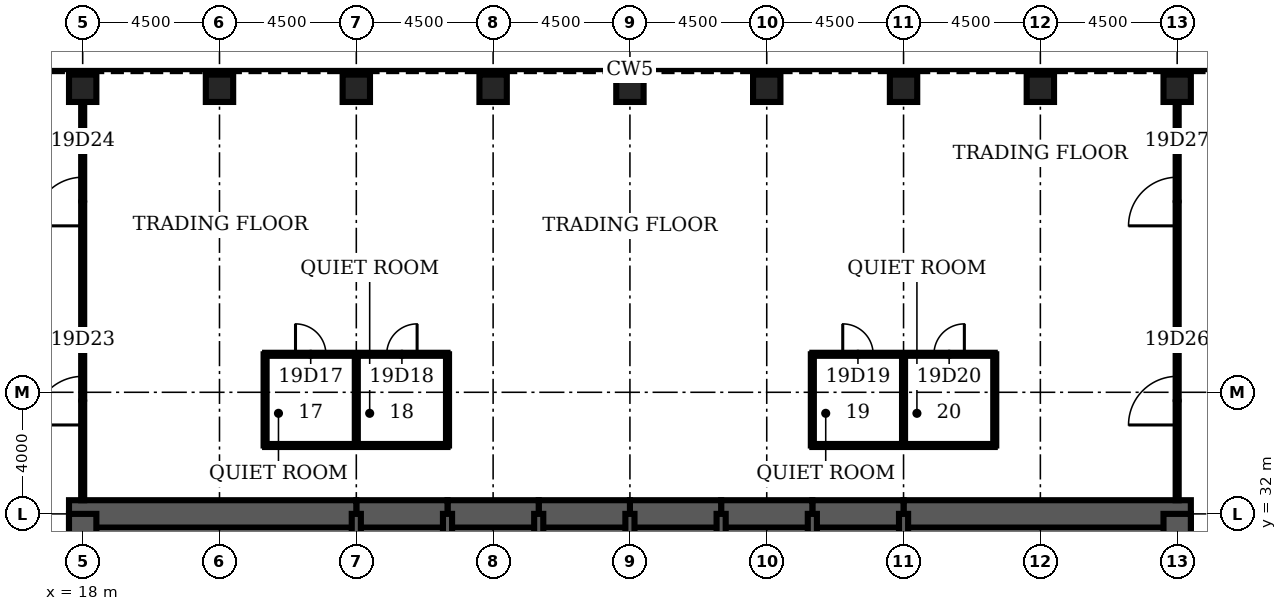
"""IFC4 building model, lengths in metres.
Left out: names, types, materials, properties, quantities, classifications, styles, units other than length and angle.
Written with IfcOpenShell. Run it as: python <this file> out.ifc"""

import sys

from ifc_helpers import new_model, si_unit, direction, frame, frame_2d, origin, origin_2d, place, context, subcontext, project, spatial, rectangle, hollow_rectangle, extrude, element, fill, save


model = new_model("IFC4")
c1 = context("Model", 3, precision=1e-05, world=origin(), true_north=direction((0.0, 1.0)))
c2 = subcontext(c1, "Body", "Model", "MODEL_VIEW")
j1 = project(units=[si_unit("LENGTHUNIT", "METRE"), si_unit("PLANEANGLEUNIT", "RADIAN")], contexts=[c1])
p1 = place(None, origin())
s1 = spatial("IfcSite", under=j1, at=p1, CompositionType="ELEMENT")
p2 = place(p1, origin())
s2 = spatial("IfcBuilding", under=s1, at=p2, CompositionType="ELEMENT")
p3 = place(p2, frame((0.0, 0.0, 90.5)))
s3 = spatial("IfcBuildingStorey", under=s2, at=p3, CompositionType="ELEMENT", Elevation=90.5)
for number, where, z_axis, x_axis in (
    (1, (54.0, 46.0, 0.0), (0.0, 0.0, 1.0), (0.0, 1.0, 0.0)),
    (2, (49.5, 46.0, 0.0), (0.0, 0.0, 1.0), (0.0, 1.0, 0.0)),
    (3, (45.0, 46.0, 0.0), (0.0, 0.0, 1.0), (0.0, 1.0, 0.0)),
    (4, (40.5, 46.0, 0.0), (0.0, 0.0, 1.0), (0.0, 1.0, 0.0)),
    (5, (36.0, 46.0, 0.0), (0.0, 0.0, 1.0), (0.0, 1.0, 0.0)),
    (6, (31.5, 46.0, 0.0), (0.0, 0.0, 1.0), (0.0, 1.0, 0.0)),
    (7, (27.0, 46.0, 0.0), (0.0, 0.0, 1.0), (0.0, 1.0, 0.0)),
    (8, (22.5, 46.0, 0.0), (0.0, 0.0, 1.0), (0.0, 1.0, 0.0)),
    (9, (18.0, 46.0, 0.0), (0.0, 0.0, 1.0), (0.0, 1.0, 0.0)),
):
    element("IfcColumn", number, at=place(p3, frame(where, z_axis=z_axis, x_axis=x_axis)), inside=s3, PredefinedType="COLUMN", context=c2, shape_type="SweptSolid", body=[
        extrude(hollow_rectangle(XDim=0.9, YDim=0.9, WallThickness=0.11, at=origin_2d()), origin(), (0.0, 0.0, 1.0), 4.5),
    ])
p4 = place(p3, frame((54.45, 32.0, 0.0), z_axis=(0.0, 0.0, 1.0), x_axis=(-1.0, 0.0, 0.0)))
e10 = element("IfcWall", 10, at=p4, inside=s3, PredefinedType="SHEAR", context=c2, shape_type="SweptSolid", body=[
    extrude(rectangle(XDim=9.45, YDim=0.9, at=frame_2d((4.725, 0.0))), origin(), (0.0, 0.0, 1.0), 4.5),
])
for number, where, z_axis, x_axis in (
    (11, (45.0, 32.0, 0.0), (0.0, 0.0, 1.0), (-1.0, 0.0, 0.0)),
    (12, (42.0, 32.0, 0.0), (0.0, 0.0, 1.0), (-1.0, 0.0, 0.0)),
    (13, (39.0, 32.0, 0.0), (0.0, 0.0, 1.0), (-1.0, 0.0, 0.0)),
    (14, (36.0, 32.0, 0.0), (0.0, 0.0, 1.0), (-1.0, 0.0, 0.0)),
    (15, (33.0, 32.0, 0.0), (0.0, 0.0, 1.0), (-1.0, 0.0, 0.0)),
    (16, (30.0, 32.0, 0.0), (0.0, 0.0, 1.0), (-1.0, 0.0, 0.0)),
):
    element("IfcWall", number, at=place(p3, frame(where, z_axis=z_axis, x_axis=x_axis)), inside=s3, PredefinedType="SHEAR", context=c2, shape_type="SweptSolid", body=[
        extrude(rectangle(XDim=3.0, YDim=0.9, at=frame_2d((1.5, 0.0))), origin(), (0.0, 0.0, 1.0), 4.5),
    ])
p5 = place(p3, frame((27.0, 32.0, 0.0), z_axis=(0.0, 0.0, 1.0), x_axis=(-1.0, 0.0, 0.0)))
e17 = element("IfcWall", 17, at=p5, inside=s3, PredefinedType="SHEAR", context=c2, shape_type="SweptSolid", body=[
    extrude(rectangle(XDim=9.45, YDim=0.9, at=frame_2d((4.725, 0.0))), origin(), (0.0, 0.0, 1.0), 4.5),
])
for number, where, z_axis, x_axis in (
    (18, (18.0, 32.0, 0.0), (0.0, 0.0, 1.0), (0.0, -1.0, 0.0)),
    (19, (54.0, 28.8, 0.0), (0.0, 0.0, 1.0), (0.0, 1.0, 0.0)),
):
    element("IfcWall", number, at=place(p3, frame(where, z_axis=z_axis, x_axis=x_axis)), inside=s3, PredefinedType="SHEAR", context=c2, shape_type="SweptSolid", body=[
        extrude(rectangle(XDim=3.2, YDim=0.9, at=frame_2d((1.6, 0.0))), origin(), (0.0, 0.0, 1.0), 4.5),
    ])
for number, where, z_axis, x_axis in (
    (20, (27.0, 28.8, 0.0), (0.0, 0.0, 1.0), (0.0, 1.0, 0.0)),
    (21, (30.0, 28.8, 0.0), (0.0, 0.0, 1.0), (0.0, 1.0, 0.0)),
    (22, (33.0, 28.8, 0.0), (0.0, 0.0, 1.0), (0.0, 1.0, 0.0)),
    (23, (36.0, 28.8, 0.0), (0.0, 0.0, 1.0), (0.0, 1.0, 0.0)),
    (24, (39.0, 28.8, 0.0), (0.0, 0.0, 1.0), (0.0, 1.0, 0.0)),
    (25, (42.0, 28.8, 0.0), (0.0, 0.0, 1.0), (0.0, 1.0, 0.0)),
    (26, (45.0, 28.8, 0.0), (0.0, 0.0, 1.0), (0.0, 1.0, 0.0)),
):
    element("IfcWall", number, at=place(p3, frame(where, z_axis=z_axis, x_axis=x_axis)), inside=s3, PredefinedType="SOLIDWALL", context=c2, shape_type="SweptSolid", body=[
        extrude(rectangle(XDim=3.2, YDim=0.3, at=frame_2d((1.6, 0.0))), origin(), (0.0, 0.0, 1.0), 4.5),
    ])
for number, where, z_axis, x_axis in (
    (27, (24.0, 34.25, 0.0), (0.0, 0.0, 1.0), (1.0, 0.0, 0.0)),
    (28, (42.0, 34.25, 0.0), (0.0, 0.0, 1.0), (1.0, 0.0, 0.0)),
):
    element("IfcWall", number, at=place(p3, frame(where, z_axis=z_axis, x_axis=x_axis)), inside=s3, PredefinedType="PARTITIONING", context=c2, shape_type="SweptSolid", body=[
        extrude(rectangle(XDim=6.0, YDim=0.1, at=frame_2d((3.0, 0.0))), origin(), (0.0, 0.0, 1.0), 3.0),
    ])
p6 = place(p3, frame((24.0, 37.25, 0.0), z_axis=(0.0, 0.0, 1.0), x_axis=(1.0, 0.0, 0.0)))
e29 = element("IfcWall", 29, at=p6, inside=s3, PredefinedType="PARTITIONING", context=c2, shape_type="SweptSolid", body=[
    extrude(rectangle(XDim=6.0, YDim=0.1, at=frame_2d((3.0, 0.0))), origin(), (0.0, 0.0, 1.0), 3.0),
])
p7 = place(p6, frame((1.0, 0.0, 0.0)))
e30 = element("IfcOpeningElement", 30, at=p7, cuts=e29, PredefinedType="OPENING", context=c2, shape_type="SweptSolid", body=[
    extrude(rectangle(XDim=1.0, YDim=2.1, at=frame_2d((0.5, 1.05))), frame((0.0, 0.06, 0.0), z_axis=(0.0, -1.0, 0.0), x_axis=(1.0, 0.0, 0.0)), (0.0, 0.0, 1.0), 0.12),
])
p8 = place(p6, frame((4.0, 0.0, 0.0)))
e31 = element("IfcOpeningElement", 31, at=p8, cuts=e29, PredefinedType="OPENING", context=c2, shape_type="SweptSolid", body=[
    extrude(rectangle(XDim=1.0, YDim=2.1, at=frame_2d((0.5, 1.05))), frame((0.0, 0.06, 0.0), z_axis=(0.0, -1.0, 0.0), x_axis=(1.0, 0.0, 0.0)), (0.0, 0.0, 1.0), 0.12),
])
p9 = place(p3, frame((42.0, 37.25, 0.0), z_axis=(0.0, 0.0, 1.0), x_axis=(1.0, 0.0, 0.0)))
e32 = element("IfcWall", 32, at=p9, inside=s3, PredefinedType="PARTITIONING", context=c2, shape_type="SweptSolid", body=[
    extrude(rectangle(XDim=6.0, YDim=0.1, at=frame_2d((3.0, 0.0))), origin(), (0.0, 0.0, 1.0), 3.0),
])
p10 = place(p9, frame((1.0, 0.0, 0.0)))
e33 = element("IfcOpeningElement", 33, at=p10, cuts=e32, PredefinedType="OPENING", context=c2, shape_type="SweptSolid", body=[
    extrude(rectangle(XDim=1.0, YDim=2.1, at=frame_2d((0.5, 1.05))), frame((0.0, 0.06, 0.0), z_axis=(0.0, -1.0, 0.0), x_axis=(1.0, 0.0, 0.0)), (0.0, 0.0, 1.0), 0.12),
])
p11 = place(p9, frame((4.0, 0.0, 0.0)))
e34 = element("IfcOpeningElement", 34, at=p11, cuts=e32, PredefinedType="OPENING", context=c2, shape_type="SweptSolid", body=[
    extrude(rectangle(XDim=1.0, YDim=2.1, at=frame_2d((0.5, 1.05))), frame((0.0, 0.06, 0.0), z_axis=(0.0, -1.0, 0.0), x_axis=(1.0, 0.0, 0.0)), (0.0, 0.0, 1.0), 0.12),
])
p12 = place(p3, frame((18.0, 32.45, 0.0), z_axis=(0.0, 0.0, 1.0), x_axis=(0.0, 1.0, 0.0)))
e35 = element("IfcWall", 35, at=p12, inside=s3, PredefinedType="PARTITIONING", context=c2, shape_type="SweptSolid", body=[
    extrude(rectangle(XDim=13.1, YDim=0.1, at=frame_2d((6.55, 0.0))), origin(), (0.0, 0.0, 1.0), 3.0),
])
p13 = place(p12, frame((2.475, 0.0, 0.0)))
e36 = element("IfcOpeningElement", 36, at=p13, cuts=e35, PredefinedType="OPENING", context=c2, shape_type="SweptSolid", body=[
    extrude(rectangle(XDim=1.6, YDim=2.1, at=frame_2d((0.8, 1.05))), frame((0.0, 0.06, 0.0), z_axis=(0.0, -1.0, 0.0), x_axis=(1.0, 0.0, 0.0)), (0.0, 0.0, 1.0), 0.12),
])
p14 = place(p12, frame((9.025, 0.0, 0.0)))
e37 = element("IfcOpeningElement", 37, at=p14, cuts=e35, PredefinedType="OPENING", context=c2, shape_type="SweptSolid", body=[
    extrude(rectangle(XDim=1.6, YDim=2.1, at=frame_2d((0.8, 1.05))), frame((0.0, 0.06, 0.0), z_axis=(0.0, -1.0, 0.0), x_axis=(1.0, 0.0, 0.0)), (0.0, 0.0, 1.0), 0.12),
])
for number, where, z_axis, x_axis in (
    (38, (24.0, 34.25, 0.0), (0.0, 0.0, 1.0), (0.0, 1.0, 0.0)),
    (39, (27.0, 34.25, 0.0), (0.0, 0.0, 1.0), (0.0, 1.0, 0.0)),
    (40, (30.0, 34.25, 0.0), (0.0, 0.0, 1.0), (0.0, 1.0, 0.0)),
    (41, (42.0, 34.25, 0.0), (0.0, 0.0, 1.0), (0.0, 1.0, 0.0)),
    (42, (45.0, 34.25, 0.0), (0.0, 0.0, 1.0), (0.0, 1.0, 0.0)),
    (43, (48.0, 34.25, 0.0), (0.0, 0.0, 1.0), (0.0, 1.0, 0.0)),
):
    element("IfcWall", number, at=place(p3, frame(where, z_axis=z_axis, x_axis=x_axis)), inside=s3, PredefinedType="PARTITIONING", context=c2, shape_type="SweptSolid", body=[
        extrude(rectangle(XDim=3.0, YDim=0.1, at=frame_2d((1.5, 0.0))), origin(), (0.0, 0.0, 1.0), 3.0),
    ])
p15 = place(p3, frame((54.0, 32.45, 0.0), z_axis=(0.0, 0.0, 1.0), x_axis=(0.0, 1.0, 0.0)))
e44 = element("IfcWall", 44, at=p15, inside=s3, PredefinedType="PARTITIONING", context=c2, shape_type="SweptSolid", body=[
    extrude(rectangle(XDim=13.1, YDim=0.1, at=frame_2d((6.55, 0.0))), origin(), (0.0, 0.0, 1.0), 3.0),
])
p16 = place(p15, frame((2.475, 0.0, 0.0)))
e45 = element("IfcOpeningElement", 45, at=p16, cuts=e44, PredefinedType="OPENING", context=c2, shape_type="SweptSolid", body=[
    extrude(rectangle(XDim=1.6, YDim=2.1, at=frame_2d((0.8, 1.05))), frame((0.0, 0.06, 0.0), z_axis=(0.0, -1.0, 0.0), x_axis=(1.0, 0.0, 0.0)), (0.0, 0.0, 1.0), 0.12),
])
p17 = place(p15, frame((9.025, 0.0, 0.0)))
e46 = element("IfcOpeningElement", 46, at=p17, cuts=e44, PredefinedType="OPENING", context=c2, shape_type="SweptSolid", body=[
    extrude(rectangle(XDim=1.6, YDim=2.1, at=frame_2d((0.8, 1.05))), frame((0.0, 0.06, 0.0), z_axis=(0.0, -1.0, 0.0), x_axis=(1.0, 0.0, 0.0)), (0.0, 0.0, 1.0), 0.12),
])
p18 = place(p7, origin())
e47 = element("IfcDoor", 47, at=p18, inside=s3, OperationType="SINGLE_SWING_LEFT", PredefinedType="DOOR", context=c2, shape_type="SweptSolid", body=[
    extrude(rectangle(XDim=1.0, YDim=2.1, at=frame_2d((0.5, 1.05))), frame((0.0, 0.025, 0.0), z_axis=(0.0, -1.0, 0.0), x_axis=(1.0, 0.0, 0.0)), (0.0, 0.0, 1.0), 0.05),
])
fill(e30, e47)
p19 = place(p8, origin())
e48 = element("IfcDoor", 48, at=p19, inside=s3, OperationType="SINGLE_SWING_RIGHT", PredefinedType="DOOR", context=c2, shape_type="SweptSolid", body=[
    extrude(rectangle(XDim=1.0, YDim=2.1, at=frame_2d((0.5, 1.05))), frame((0.0, 0.025, 0.0), z_axis=(0.0, -1.0, 0.0), x_axis=(1.0, 0.0, 0.0)), (0.0, 0.0, 1.0), 0.05),
])
fill(e31, e48)
p20 = place(p10, origin())
e49 = element("IfcDoor", 49, at=p20, inside=s3, OperationType="SINGLE_SWING_LEFT", PredefinedType="DOOR", context=c2, shape_type="SweptSolid", body=[
    extrude(rectangle(XDim=1.0, YDim=2.1, at=frame_2d((0.5, 1.05))), frame((0.0, 0.025, 0.0), z_axis=(0.0, -1.0, 0.0), x_axis=(1.0, 0.0, 0.0)), (0.0, 0.0, 1.0), 0.05),
])
fill(e33, e49)
p21 = place(p11, origin())
e50 = element("IfcDoor", 50, at=p21, inside=s3, OperationType="SINGLE_SWING_RIGHT", PredefinedType="DOOR", context=c2, shape_type="SweptSolid", body=[
    extrude(rectangle(XDim=1.0, YDim=2.1, at=frame_2d((0.5, 1.05))), frame((0.0, 0.025, 0.0), z_axis=(0.0, -1.0, 0.0), x_axis=(1.0, 0.0, 0.0)), (0.0, 0.0, 1.0), 0.05),
])
fill(e34, e50)
p22 = place(p13, origin())
e51 = element("IfcDoor", 51, at=p22, inside=s3, OperationType="SINGLE_SWING_LEFT", PredefinedType="DOOR", context=c2, shape_type="SweptSolid", body=[
    extrude(rectangle(XDim=1.6, YDim=2.1, at=frame_2d((0.8, 1.05))), frame((0.0, 0.025, 0.0), z_axis=(0.0, -1.0, 0.0), x_axis=(1.0, 0.0, 0.0)), (0.0, 0.0, 1.0), 0.05),
])
fill(e36, e51)
p23 = place(p14, origin())
e52 = element("IfcDoor", 52, at=p23, inside=s3, OperationType="SINGLE_SWING_LEFT", PredefinedType="DOOR", context=c2, shape_type="SweptSolid", body=[
    extrude(rectangle(XDim=1.6, YDim=2.1, at=frame_2d((0.8, 1.05))), frame((0.0, 0.025, 0.0), z_axis=(0.0, -1.0, 0.0), x_axis=(1.0, 0.0, 0.0)), (0.0, 0.0, 1.0), 0.05),
])
fill(e37, e52)
p24 = place(p16, origin())
e53 = element("IfcDoor", 53, at=p24, inside=s3, OperationType="SINGLE_SWING_LEFT", PredefinedType="DOOR", context=c2, shape_type="SweptSolid", body=[
    extrude(rectangle(XDim=1.6, YDim=2.1, at=frame_2d((0.8, 1.05))), frame((0.0, 0.025, 0.0), z_axis=(0.0, -1.0, 0.0), x_axis=(1.0, 0.0, 0.0)), (0.0, 0.0, 1.0), 0.05),
])
fill(e45, e53)
p25 = place(p17, origin())
e54 = element("IfcDoor", 54, at=p25, inside=s3, OperationType="SINGLE_SWING_LEFT", PredefinedType="DOOR", context=c2, shape_type="SweptSolid", body=[
    extrude(rectangle(XDim=1.6, YDim=2.1, at=frame_2d((0.8, 1.05))), frame((0.0, 0.025, 0.0), z_axis=(0.0, -1.0, 0.0), x_axis=(1.0, 0.0, 0.0)), (0.0, 0.0, 1.0), 0.05),
])
fill(e46, e54)
save(model, sys.argv[1])
